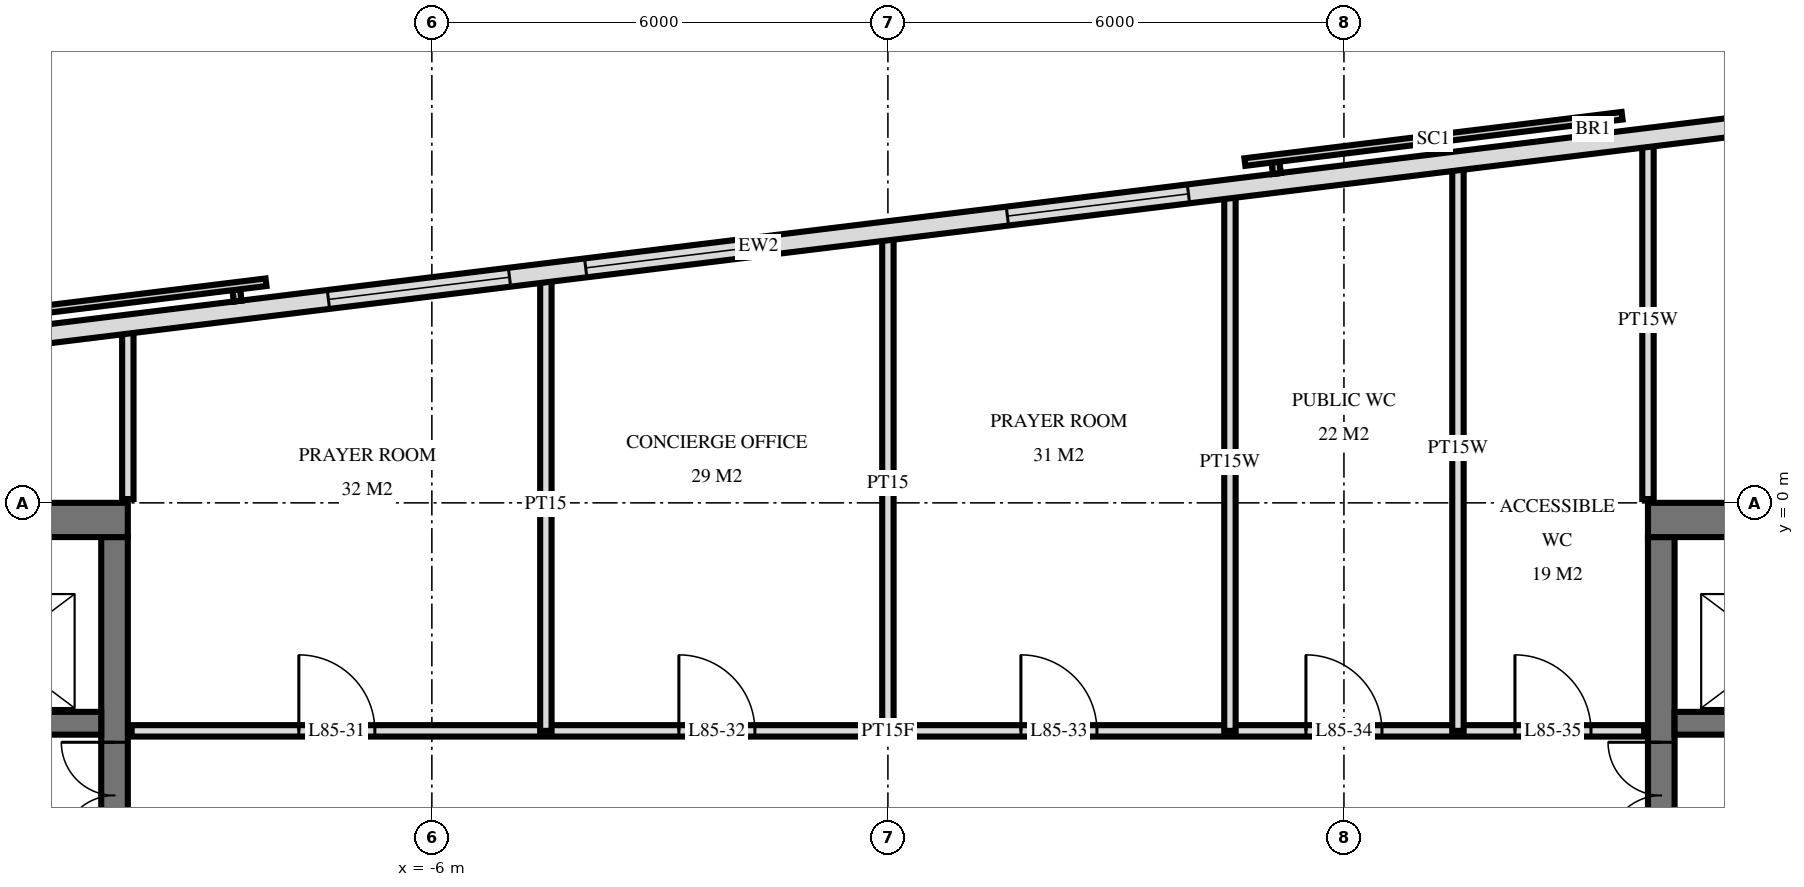
"""IFC4 building model, lengths in metres.
Left out: names, types, materials, properties, quantities, classifications, styles, units other than length and angle.
Written with IfcOpenShell. Run it as: python <this file> out.ifc"""

import sys

from ifc_helpers import new_model, si_unit, direction, frame, frame_2d, origin, place, context, subcontext, project, spatial, rectangle, extrude, element, fill, save


model = new_model("IFC4")
c1 = context("Model", 3, precision=1e-05, world=origin(), true_north=direction((0.0, 1.0)))
c2 = subcontext(c1, "Body", "Model", "MODEL_VIEW")
j1 = project(units=[si_unit("LENGTHUNIT", "METRE"), si_unit("PLANEANGLEUNIT", "RADIAN")], contexts=[c1])
p1 = place(None, origin())
s1 = spatial("IfcSite", under=j1, at=p1, CompositionType="ELEMENT")
p2 = place(p1, origin())
s2 = spatial("IfcBuilding", under=s1, at=p2, CompositionType="ELEMENT")
p3 = place(p2, frame((0.0, 0.0, 322.6)))
s3 = spatial("IfcBuildingStorey", under=s2, at=p3, CompositionType="ELEMENT", Elevation=322.6)
p4 = place(p3, frame((-19.5, -0.225, 0.0), z_axis=(0.0, 0.0, 1.0), x_axis=(1.0, 0.0, 0.0)))
e1 = element("IfcWall", 1, at=p4, inside=s3, PredefinedType="SHEAR", context=c2, shape_type="SweptSolid", body=[
    extrude(rectangle(XDim=9.5, YDim=0.45, at=frame_2d((4.75, 0.0))), origin(), (0.0, 0.0, 1.0), 4.0),
])
p5 = place(p3, frame((-10.175, -14.55, 0.0), z_axis=(0.0, 0.0, 1.0), x_axis=(0.0, 1.0, 0.0)))
e2 = element("IfcWall", 2, at=p5, inside=s3, PredefinedType="SHEAR", context=c2, shape_type="SweptSolid", body=[
    extrude(rectangle(XDim=14.1, YDim=0.35, at=frame_2d((7.05, 0.0))), origin(), (0.0, 0.0, 1.0), 4.0),
])
p6 = place(p5, frame((8.4, 0.0, 0.0)))
e3 = element("IfcOpeningElement", 3, at=p6, cuts=e2, PredefinedType="OPENING", context=c2, shape_type="SweptSolid", body=[
    extrude(rectangle(XDim=1.4, YDim=2.4, at=frame_2d((0.7, 1.2))), frame((0.0, 0.185, 0.0), z_axis=(0.0, -1.0, 0.0), x_axis=(1.0, 0.0, 0.0)), (0.0, 0.0, 1.0), 0.37),
])
p7 = place(p5, frame((10.0, 0.0, 0.0)))
e4 = element("IfcOpeningElement", 4, at=p7, cuts=e2, PredefinedType="OPENING", context=c2, shape_type="SweptSolid", body=[
    extrude(rectangle(XDim=1.4, YDim=2.4, at=frame_2d((0.7, 1.2))), frame((0.0, 0.185, 0.0), z_axis=(0.0, -1.0, 0.0), x_axis=(1.0, 0.0, 0.0)), (0.0, 0.0, 1.0), 0.37),
])
p8 = place(p5, frame((4.0, 0.0, 0.0)))
e5 = element("IfcOpeningElement", 5, at=p8, cuts=e2, PredefinedType="OPENING", context=c2, shape_type="SweptSolid", body=[
    extrude(rectangle(XDim=1.2, YDim=2.1, at=frame_2d((0.6, 1.05))), frame((0.0, 0.185, 0.0), z_axis=(0.0, -1.0, 0.0), x_axis=(1.0, 0.0, 0.0)), (0.0, 0.0, 1.0), 0.37),
])
p9 = place(p3, frame((-19.05, -2.9, 0.0), z_axis=(0.0, 0.0, 1.0), x_axis=(1.0, 0.0, 0.0)))
e6 = element("IfcWall", 6, at=p9, inside=s3, PredefinedType="SHEAR", context=c2, shape_type="SweptSolid", body=[
    extrude(rectangle(XDim=8.7, YDim=0.3, at=frame_2d((4.35, 0.0))), origin(), (0.0, 0.0, 1.0), 4.0),
])
p10 = place(p9, frame((6.8, 0.0, 0.0)))
e7 = element("IfcOpeningElement", 7, at=p10, cuts=e6, PredefinedType="OPENING", context=c2, shape_type="SweptSolid", body=[
    extrude(rectangle(XDim=1.1, YDim=2.1, at=frame_2d((0.55, 1.05))), frame((0.0, 0.16, 0.0), z_axis=(0.0, -1.0, 0.0), x_axis=(1.0, 0.0, 0.0)), (0.0, 0.0, 1.0), 0.32),
])
p11 = place(p9, frame((3.8, 0.0, 0.0)))
e8 = element("IfcOpeningElement", 8, at=p11, cuts=e6, PredefinedType="OPENING", context=c2, shape_type="SweptSolid", body=[
    extrude(rectangle(XDim=1.1, YDim=2.1, at=frame_2d((0.55, 1.05))), frame((0.0, 0.16, 0.0), z_axis=(0.0, -1.0, 0.0), x_axis=(1.0, 0.0, 0.0)), (0.0, 0.0, 1.0), 0.32),
])
p12 = place(p9, frame((0.9, 0.0, 0.0)))
e9 = element("IfcOpeningElement", 9, at=p12, cuts=e6, PredefinedType="OPENING", context=c2, shape_type="SweptSolid", body=[
    extrude(rectangle(XDim=0.9, YDim=2.1, at=frame_2d((0.45, 1.05))), frame((0.0, 0.16, 0.0), z_axis=(0.0, -1.0, 0.0), x_axis=(1.0, 0.0, 0.0)), (0.0, 0.0, 1.0), 0.32),
])
p13 = place(p3, frame((10.0, -0.225, 0.0), z_axis=(0.0, 0.0, 1.0), x_axis=(1.0, 0.0, 0.0)))
e10 = element("IfcWall", 10, at=p13, inside=s3, PredefinedType="SHEAR", context=c2, shape_type="SweptSolid", body=[
    extrude(rectangle(XDim=9.5, YDim=0.45, at=frame_2d((4.75, 0.0))), origin(), (0.0, 0.0, 1.0), 4.0),
])
p14 = place(p3, frame((10.175, -14.55, 0.0), z_axis=(0.0, 0.0, 1.0), x_axis=(0.0, 1.0, 0.0)))
e11 = element("IfcWall", 11, at=p14, inside=s3, PredefinedType="SHEAR", context=c2, shape_type="SweptSolid", body=[
    extrude(rectangle(XDim=14.1, YDim=0.35, at=frame_2d((7.05, 0.0))), origin(), (0.0, 0.0, 1.0), 4.0),
])
p15 = place(p14, frame((8.4, 0.0, 0.0)))
e12 = element("IfcOpeningElement", 12, at=p15, cuts=e11, PredefinedType="OPENING", context=c2, shape_type="SweptSolid", body=[
    extrude(rectangle(XDim=1.4, YDim=2.4, at=frame_2d((0.7, 1.2))), frame((0.0, 0.185, 0.0), z_axis=(0.0, -1.0, 0.0), x_axis=(1.0, 0.0, 0.0)), (0.0, 0.0, 1.0), 0.37),
])
p16 = place(p14, frame((10.0, 0.0, 0.0)))
e13 = element("IfcOpeningElement", 13, at=p16, cuts=e11, PredefinedType="OPENING", context=c2, shape_type="SweptSolid", body=[
    extrude(rectangle(XDim=1.4, YDim=2.4, at=frame_2d((0.7, 1.2))), frame((0.0, 0.185, 0.0), z_axis=(0.0, -1.0, 0.0), x_axis=(1.0, 0.0, 0.0)), (0.0, 0.0, 1.0), 0.37),
])
p17 = place(p14, frame((4.0, 0.0, 0.0)))
e14 = element("IfcOpeningElement", 14, at=p17, cuts=e11, PredefinedType="OPENING", context=c2, shape_type="SweptSolid", body=[
    extrude(rectangle(XDim=1.2, YDim=2.1, at=frame_2d((0.6, 1.05))), frame((0.0, 0.185, 0.0), z_axis=(0.0, -1.0, 0.0), x_axis=(1.0, 0.0, 0.0)), (0.0, 0.0, 1.0), 0.37),
])
p18 = place(p3, frame((10.35, -2.9, 0.0), z_axis=(0.0, 0.0, 1.0), x_axis=(1.0, 0.0, 0.0)))
e15 = element("IfcWall", 15, at=p18, inside=s3, PredefinedType="SHEAR", context=c2, shape_type="SweptSolid", body=[
    extrude(rectangle(XDim=8.7, YDim=0.3, at=frame_2d((4.35, 0.0))), origin(), (0.0, 0.0, 1.0), 4.0),
])
p19 = place(p18, frame((0.8, 0.0, 0.0)))
e16 = element("IfcOpeningElement", 16, at=p19, cuts=e15, PredefinedType="OPENING", context=c2, shape_type="SweptSolid", body=[
    extrude(rectangle(XDim=1.1, YDim=2.1, at=frame_2d((0.55, 1.05))), frame((0.0, 0.16, 0.0), z_axis=(0.0, -1.0, 0.0), x_axis=(1.0, 0.0, 0.0)), (0.0, 0.0, 1.0), 0.32),
])
p20 = place(p18, frame((3.8, 0.0, 0.0)))
e17 = element("IfcOpeningElement", 17, at=p20, cuts=e15, PredefinedType="OPENING", context=c2, shape_type="SweptSolid", body=[
    extrude(rectangle(XDim=1.1, YDim=2.1, at=frame_2d((0.55, 1.05))), frame((0.0, 0.16, 0.0), z_axis=(0.0, -1.0, 0.0), x_axis=(1.0, 0.0, 0.0)), (0.0, 0.0, 1.0), 0.32),
])
p21 = place(p18, frame((6.9, 0.0, 0.0)))
e18 = element("IfcOpeningElement", 18, at=p21, cuts=e15, PredefinedType="OPENING", context=c2, shape_type="SweptSolid", body=[
    extrude(rectangle(XDim=0.9, YDim=2.1, at=frame_2d((0.45, 1.05))), frame((0.0, 0.16, 0.0), z_axis=(0.0, -1.0, 0.0), x_axis=(1.0, 0.0, 0.0)), (0.0, 0.0, 1.0), 0.32),
])
p22 = place(p3, frame((16.138, 5.561, 0.0), z_axis=(0.0, 0.0, 1.0), x_axis=(-0.992546726876, -0.121864658405, 0.0)))
e19 = element("IfcWall", 19, at=p22, inside=s3, PredefinedType="SOLIDWALL", context=c2, shape_type="SweptSolid", body=[
    extrude(rectangle(XDim=35.951, YDim=0.25, at=frame_2d((17.975, 0.0))), origin(), (0.0, 0.0, 1.0), 3.72),
])
p23 = place(p22, frame((12.275, 0.0, 0.0)))
e20 = element("IfcOpeningElement", 20, at=p23, cuts=e19, PredefinedType="OPENING", context=c2, shape_type="SweptSolid", body=[
    extrude(rectangle(XDim=2.4, YDim=2.4, at=frame_2d((1.2, 1.2))), frame((0.0, 0.135, 0.0), z_axis=(0.0, -1.0, 0.0), x_axis=(1.0, 0.0, 0.0)), (0.0, 0.0, 1.0), 0.27),
])
p24 = place(p22, frame((17.865, 0.0, 0.0)))
e21 = element("IfcOpeningElement", 21, at=p24, cuts=e19, PredefinedType="OPENING", context=c2, shape_type="SweptSolid", body=[
    extrude(rectangle(XDim=2.4, YDim=2.4, at=frame_2d((1.2, 1.2))), frame((0.0, 0.135, 0.0), z_axis=(0.0, -1.0, 0.0), x_axis=(1.0, 0.0, 0.0)), (0.0, 0.0, 1.0), 0.27),
])
p25 = place(p22, frame((21.275, 0.0, 0.0)))
e22 = element("IfcOpeningElement", 22, at=p25, cuts=e19, PredefinedType="OPENING", context=c2, shape_type="SweptSolid", body=[
    extrude(rectangle(XDim=2.4, YDim=2.4, at=frame_2d((1.2, 1.2))), frame((0.0, 0.135, 0.0), z_axis=(0.0, -1.0, 0.0), x_axis=(1.0, 0.0, 0.0)), (0.0, 0.0, 1.0), 0.27),
])
p26 = place(p3, frame((10.0, 0.05, 0.0), z_axis=(0.0, 0.0, 1.0), x_axis=(0.0, 1.0, 0.0)))
e23 = element("IfcWall", 23, at=p26, inside=s3, PredefinedType="PLUMBINGWALL", context=c2, shape_type="SweptSolid", body=[
    extrude(rectangle(XDim=4.702, YDim=0.15, at=frame_2d((2.351, 0.0))), origin(), (0.0, 0.0, 1.0), 3.72),
])
p27 = place(p3, frame((7.5, -3.0, 0.0), z_axis=(0.0, 0.0, 1.0), x_axis=(0.0, 1.0, 0.0)))
e24 = element("IfcWall", 24, at=p27, inside=s3, PredefinedType="PLUMBINGWALL", context=c2, shape_type="SweptSolid", body=[
    extrude(rectangle(XDim=7.445, YDim=0.15, at=frame_2d((3.723, 0.0))), origin(), (0.0, 0.0, 1.0), 3.72),
])
p28 = place(p3, frame((4.5, -3.0, 0.0), z_axis=(0.0, 0.0, 1.0), x_axis=(0.0, 1.0, 0.0)))
e25 = element("IfcWall", 25, at=p28, inside=s3, PredefinedType="PLUMBINGWALL", context=c2, shape_type="SweptSolid", body=[
    extrude(rectangle(XDim=7.077, YDim=0.15, at=frame_2d((3.539, 0.0))), origin(), (0.0, 0.0, 1.0), 3.72),
])
p29 = place(p3, frame((0.0, -3.0, 0.0), z_axis=(0.0, 0.0, 1.0), x_axis=(0.0, 1.0, 0.0)))
e26 = element("IfcWall", 26, at=p29, inside=s3, PredefinedType="PARTITIONING", context=c2, shape_type="SweptSolid", body=[
    extrude(rectangle(XDim=6.524, YDim=0.15, at=frame_2d((3.262, 0.0))), origin(), (0.0, 0.0, 1.0), 3.72),
])
p30 = place(p3, frame((-4.5, -3.0, 0.0), z_axis=(0.0, 0.0, 1.0), x_axis=(0.0, 1.0, 0.0)))
e27 = element("IfcWall", 27, at=p30, inside=s3, PredefinedType="PARTITIONING", context=c2, shape_type="SweptSolid", body=[
    extrude(rectangle(XDim=5.972, YDim=0.15, at=frame_2d((2.986, 0.0))), origin(), (0.0, 0.0, 1.0), 3.72),
])
p31 = place(p3, frame((-10.0, 0.05, 0.0), z_axis=(0.0, 0.0, 1.0), x_axis=(0.0, 1.0, 0.0)))
e28 = element("IfcWall", 28, at=p31, inside=s3, PredefinedType="PARTITIONING", context=c2, shape_type="SweptSolid", body=[
    extrude(rectangle(XDim=2.247, YDim=0.15, at=frame_2d((1.123, 0.0))), origin(), (0.0, 0.0, 1.0), 3.72),
])
p32 = place(p3, frame((-9.95, -3.0, 0.0), z_axis=(0.0, 0.0, 1.0), x_axis=(1.0, 0.0, 0.0)))
e29 = element("IfcWall", 29, at=p32, inside=s3, PredefinedType="PARTITIONING", context=c2, shape_type="SweptSolid", body=[
    extrude(rectangle(XDim=19.9, YDim=0.15, at=frame_2d((9.95, 0.0))), origin(), (0.0, 0.0, 1.0), 3.72),
])
p33 = place(p32, frame((2.2, 0.0, 0.0)))
e30 = element("IfcOpeningElement", 30, at=p33, cuts=e29, PredefinedType="OPENING", context=c2, shape_type="SweptSolid", body=[
    extrude(rectangle(XDim=1.0, YDim=2.1, at=frame_2d((0.5, 1.05))), frame((0.0, 0.085, 0.0), z_axis=(0.0, -1.0, 0.0), x_axis=(1.0, 0.0, 0.0)), (0.0, 0.0, 1.0), 0.17),
])
p34 = place(p32, frame((7.2, 0.0, 0.0)))
e31 = element("IfcOpeningElement", 31, at=p34, cuts=e29, PredefinedType="OPENING", context=c2, shape_type="SweptSolid", body=[
    extrude(rectangle(XDim=1.0, YDim=2.1, at=frame_2d((0.5, 1.05))), frame((0.0, 0.085, 0.0), z_axis=(0.0, -1.0, 0.0), x_axis=(1.0, 0.0, 0.0)), (0.0, 0.0, 1.0), 0.17),
])
p35 = place(p32, frame((11.7, 0.0, 0.0)))
e32 = element("IfcOpeningElement", 32, at=p35, cuts=e29, PredefinedType="OPENING", context=c2, shape_type="SweptSolid", body=[
    extrude(rectangle(XDim=1.0, YDim=2.1, at=frame_2d((0.5, 1.05))), frame((0.0, 0.085, 0.0), z_axis=(0.0, -1.0, 0.0), x_axis=(1.0, 0.0, 0.0)), (0.0, 0.0, 1.0), 0.17),
])
p36 = place(p32, frame((15.45, 0.0, 0.0)))
e33 = element("IfcOpeningElement", 33, at=p36, cuts=e29, PredefinedType="OPENING", context=c2, shape_type="SweptSolid", body=[
    extrude(rectangle(XDim=1.0, YDim=2.1, at=frame_2d((0.5, 1.05))), frame((0.0, 0.085, 0.0), z_axis=(0.0, -1.0, 0.0), x_axis=(1.0, 0.0, 0.0)), (0.0, 0.0, 1.0), 0.17),
])
p37 = place(p32, frame((18.2, 0.0, 0.0)))
e34 = element("IfcOpeningElement", 34, at=p37, cuts=e29, PredefinedType="OPENING", context=c2, shape_type="SweptSolid", body=[
    extrude(rectangle(XDim=1.0, YDim=2.1, at=frame_2d((0.5, 1.05))), frame((0.0, 0.085, 0.0), z_axis=(0.0, -1.0, 0.0), x_axis=(1.0, 0.0, 0.0)), (0.0, 0.0, 1.0), 0.17),
])
p38 = place(p23, origin())
e35 = element("IfcWindow", 35, at=p38, inside=s3, PartitioningType="SINGLE_PANEL", PredefinedType="WINDOW", context=c2, shape_type="SweptSolid", body=[
    extrude(rectangle(XDim=2.4, YDim=2.4, at=frame_2d((1.2, 1.2))), frame((0.0, 0.03, 0.0), z_axis=(0.0, -1.0, 0.0), x_axis=(1.0, 0.0, 0.0)), (0.0, 0.0, 1.0), 0.06),
])
fill(e20, e35)
p39 = place(p24, origin())
e36 = element("IfcWindow", 36, at=p39, inside=s3, PartitioningType="SINGLE_PANEL", PredefinedType="WINDOW", context=c2, shape_type="SweptSolid", body=[
    extrude(rectangle(XDim=2.4, YDim=2.4, at=frame_2d((1.2, 1.2))), frame((0.0, 0.03, 0.0), z_axis=(0.0, -1.0, 0.0), x_axis=(1.0, 0.0, 0.0)), (0.0, 0.0, 1.0), 0.06),
])
fill(e21, e36)
p40 = place(p25, origin())
e37 = element("IfcWindow", 37, at=p40, inside=s3, PartitioningType="SINGLE_PANEL", PredefinedType="WINDOW", context=c2, shape_type="SweptSolid", body=[
    extrude(rectangle(XDim=2.4, YDim=2.4, at=frame_2d((1.2, 1.2))), frame((0.0, 0.03, 0.0), z_axis=(0.0, -1.0, 0.0), x_axis=(1.0, 0.0, 0.0)), (0.0, 0.0, 1.0), 0.06),
])
fill(e22, e37)
p41 = place(p7, origin())
e38 = element("IfcDoor", 38, at=p41, inside=s3, OperationType="DOUBLE_DOOR_SINGLE_SWING", PredefinedType="DOOR", context=c2, shape_type="SweptSolid", body=[
    extrude(rectangle(XDim=1.4, YDim=2.4, at=frame_2d((0.7, 1.2))), frame((0.0, 0.025, 0.0), z_axis=(0.0, -1.0, 0.0), x_axis=(1.0, 0.0, 0.0)), (0.0, 0.0, 1.0), 0.05),
])
fill(e4, e38)
p42 = place(p16, origin())
e39 = element("IfcDoor", 39, at=p42, inside=s3, OperationType="DOUBLE_DOOR_SINGLE_SWING", PredefinedType="DOOR", context=c2, shape_type="SweptSolid", body=[
    extrude(rectangle(XDim=1.4, YDim=2.4, at=frame_2d((0.7, 1.2))), frame((0.0, 0.025, 0.0), z_axis=(0.0, -1.0, 0.0), x_axis=(1.0, 0.0, 0.0)), (0.0, 0.0, 1.0), 0.05),
])
fill(e13, e39)
p43 = place(p33, origin())
e40 = element("IfcDoor", 40, at=p43, inside=s3, OperationType="SINGLE_SWING_RIGHT", PredefinedType="DOOR", context=c2, shape_type="SweptSolid", body=[
    extrude(rectangle(XDim=1.0, YDim=2.1, at=frame_2d((0.5, 1.05))), frame((0.0, 0.025, 0.0), z_axis=(0.0, -1.0, 0.0), x_axis=(1.0, 0.0, 0.0)), (0.0, 0.0, 1.0), 0.05),
])
fill(e30, e40)
p44 = place(p34, origin())
e41 = element("IfcDoor", 41, at=p44, inside=s3, OperationType="SINGLE_SWING_RIGHT", PredefinedType="DOOR", context=c2, shape_type="SweptSolid", body=[
    extrude(rectangle(XDim=1.0, YDim=2.1, at=frame_2d((0.5, 1.05))), frame((0.0, 0.025, 0.0), z_axis=(0.0, -1.0, 0.0), x_axis=(1.0, 0.0, 0.0)), (0.0, 0.0, 1.0), 0.05),
])
fill(e31, e41)
p45 = place(p35, origin())
e42 = element("IfcDoor", 42, at=p45, inside=s3, OperationType="SINGLE_SWING_RIGHT", PredefinedType="DOOR", context=c2, shape_type="SweptSolid", body=[
    extrude(rectangle(XDim=1.0, YDim=2.1, at=frame_2d((0.5, 1.05))), frame((0.0, 0.025, 0.0), z_axis=(0.0, -1.0, 0.0), x_axis=(1.0, 0.0, 0.0)), (0.0, 0.0, 1.0), 0.05),
])
fill(e32, e42)
p46 = place(p36, origin())
e43 = element("IfcDoor", 43, at=p46, inside=s3, OperationType="SINGLE_SWING_RIGHT", PredefinedType="DOOR", context=c2, shape_type="SweptSolid", body=[
    extrude(rectangle(XDim=1.0, YDim=2.1, at=frame_2d((0.5, 1.05))), frame((0.0, 0.025, 0.0), z_axis=(0.0, -1.0, 0.0), x_axis=(1.0, 0.0, 0.0)), (0.0, 0.0, 1.0), 0.05),
])
fill(e33, e43)
p47 = place(p37, origin())
e44 = element("IfcDoor", 44, at=p47, inside=s3, OperationType="SINGLE_SWING_RIGHT", PredefinedType="DOOR", context=c2, shape_type="SweptSolid", body=[
    extrude(rectangle(XDim=1.0, YDim=2.1, at=frame_2d((0.5, 1.05))), frame((0.0, 0.025, 0.0), z_axis=(0.0, -1.0, 0.0), x_axis=(1.0, 0.0, 0.0)), (0.0, 0.0, 1.0), 0.05),
])
fill(e34, e44)
save(model, sys.argv[1])
